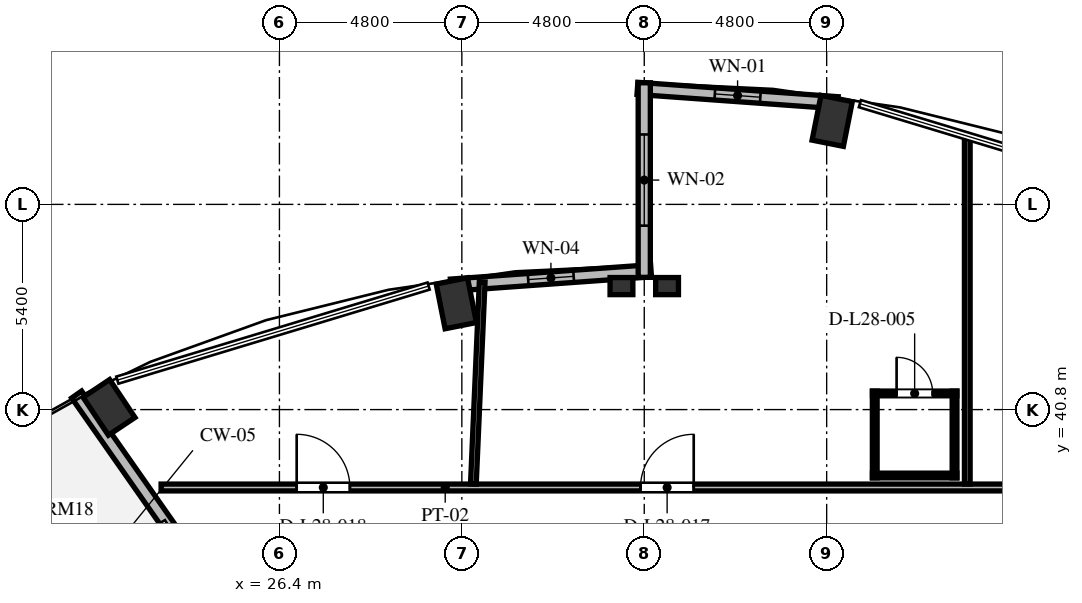
"""IFC4 building model, lengths in metres.
Left out: names, types, materials, properties, quantities, classifications, styles, units other than length and angle.
Written with IfcOpenShell. Run it as: python <this file> out.ifc"""

import sys

from ifc_helpers import new_model, si_unit, direction, frame, frame_2d, origin, origin_2d, place, context, subcontext, project, spatial, rectangle, extrude, element, fill, save


model = new_model("IFC4")
c1 = context("Model", 3, precision=1e-05, world=origin(), true_north=direction((0.0, 1.0)))
c2 = subcontext(c1, "Body", "Model", "MODEL_VIEW")
j1 = project(units=[si_unit("LENGTHUNIT", "METRE"), si_unit("PLANEANGLEUNIT", "RADIAN")], contexts=[c1])
p1 = place(None, origin())
s1 = spatial("IfcSite", under=j1, at=p1, CompositionType="ELEMENT")
p2 = place(p1, origin())
s2 = spatial("IfcBuilding", under=s1, at=p2, CompositionType="ELEMENT")
p3 = place(p2, frame((0.0, 0.0, 110.928)))
s3 = spatial("IfcBuildingStorey", under=s2, at=p3, CompositionType="ELEMENT", Elevation=110.928)
for number, where, z_axis, x_axis in (
    (1, (40.946, 48.397, 0.0), (0.0, 0.0, 1.0), (0.195, 0.981, 0.0)),
    (2, (31.054, 43.597, 0.0), (0.0, 0.0, 1.0), (-0.195, 0.981, 0.0)),
    (3, (21.916, 40.857, 0.0), (0.0, 0.0, 1.0), (-0.556, 0.831, 0.0)),
):
    element("IfcColumn", number, at=place(p3, frame(where, z_axis=z_axis, x_axis=x_axis)), inside=s3, PredefinedType="COLUMN", context=c2, shape_type="SweptSolid", body=[
        extrude(rectangle(XDim=1.2, YDim=0.84, at=origin_2d()), origin(), (0.0, 0.0, 1.0), 3.648),
    ])
for number, where, z_axis, x_axis in (
    (4, (35.4, 44.05, 0.0), (0.0, 0.0, 1.0), (1.0, 0.0, 0.0)),
    (5, (36.6, 44.05, 0.0), (0.0, 0.0, 1.0), (1.0, 0.0, 0.0)),
):
    element("IfcColumn", number, at=place(p3, frame(where, z_axis=z_axis, x_axis=x_axis)), inside=s3, PredefinedType="PILASTER", context=c2, shape_type="SweptSolid", body=[
        extrude(rectangle(XDim=0.6, YDim=0.45, at=origin_2d()), origin(), (0.0, 0.0, 1.0), 3.648),
    ])
p4 = place(p3, frame((41.091, 48.875, 0.0), z_axis=(0.0, 0.0, 1.0), x_axis=(-0.997432364291, 0.071614793619, 0.0)))
e6 = element("IfcWall", 6, at=p4, inside=s3, PredefinedType="SOLIDWALL", context=c2, shape_type="SweptSolid", body=[
    extrude(rectangle(XDim=5.284, YDim=0.32, at=frame_2d((2.642, 0.0))), origin(), (0.0, 0.0, 1.0), 3.428),
])
p5 = place(p4, frame((2.042, 0.0, 0.85)))
e7 = element("IfcOpeningElement", 7, at=p5, cuts=e6, PredefinedType="OPENING", context=c2, shape_type="SweptSolid", body=[
    extrude(rectangle(XDim=1.2, YDim=2.2, at=frame_2d((0.6, 1.1))), frame((0.0, 0.17, 0.0), z_axis=(0.0, -1.0, 0.0), x_axis=(1.0, 0.0, 0.0)), (0.0, 0.0, 1.0), 0.34),
])
p6 = place(p3, frame((36.179, 44.453, 0.0), z_axis=(0.0, 0.0, 1.0), x_axis=(-0.997431890304, -0.071621394884, 0.0)))
e8 = element("IfcWall", 8, at=p6, inside=s3, PredefinedType="SOLIDWALL", context=c2, shape_type="SweptSolid", body=[
    extrude(rectangle(XDim=5.284, YDim=0.32, at=frame_2d((2.642, 0.0))), origin(), (0.0, 0.0, 1.0), 3.428),
])
p7 = place(p6, frame((2.042, 0.0, 0.85)))
e9 = element("IfcOpeningElement", 9, at=p7, cuts=e8, PredefinedType="OPENING", context=c2, shape_type="SweptSolid", body=[
    extrude(rectangle(XDim=1.2, YDim=1.8, at=frame_2d((0.6, 0.9))), frame((0.0, 0.17, 0.0), z_axis=(0.0, -1.0, 0.0), x_axis=(1.0, 0.0, 0.0)), (0.0, 0.0, 1.0), 0.34),
])
p8 = place(p3, frame((36.0, 49.4, 0.0), z_axis=(0.0, 0.0, 1.0), x_axis=(0.0, -1.0, 0.0)))
e10 = element("IfcWall", 10, at=p8, inside=s3, PredefinedType="SOLIDWALL", context=c2, shape_type="SweptSolid", body=[
    extrude(rectangle(XDim=5.12, YDim=0.32, at=frame_2d((2.56, 0.0))), origin(), (0.0, 0.0, 1.0), 3.428),
])
p9 = place(p8, frame((1.36, 0.0, 0.84)))
e11 = element("IfcOpeningElement", 11, at=p9, cuts=e10, PredefinedType="OPENING", context=c2, shape_type="SweptSolid", body=[
    extrude(rectangle(XDim=2.4, YDim=2.04, at=frame_2d((1.2, 1.02))), frame((0.0, 0.17, 0.0), z_axis=(0.0, -1.0, 0.0), x_axis=(1.0, 0.0, 0.0)), (0.0, 0.0, 1.0), 0.34),
])
p10 = place(p3, frame((21.064, 41.197, 0.0), z_axis=(0.0, 0.0, 1.0), x_axis=(0.573586931721, -0.819144695252, 0.0)))
e12 = element("IfcWall", 12, at=p10, inside=s3, PredefinedType="SOLIDWALL", context=c2, shape_type="SweptSolid", body=[
    extrude(rectangle(XDim=4.34, YDim=0.32, at=frame_2d((2.17, 0.0))), origin(), (0.0, 0.0, 1.0), 3.428),
])
p11 = place(p3, frame((23.287, 38.75, 0.0), z_axis=(0.0, 0.0, 1.0), x_axis=(1.0, 0.0, 0.0)))
e13 = element("IfcWall", 13, at=p11, inside=s3, PredefinedType="PARTITIONING", context=c2, shape_type="SweptSolid", body=[
    extrude(rectangle(XDim=29.903, YDim=0.18, at=frame_2d((14.952, 0.0))), origin(), (0.0, 0.0, 1.0), 3.053),
])
p12 = place(p11, frame((12.615, 0.0, 0.0)))
e14 = element("IfcOpeningElement", 14, at=p12, cuts=e13, PredefinedType="OPENING", context=c2, shape_type="SweptSolid", body=[
    extrude(rectangle(XDim=1.4, YDim=2.2, at=frame_2d((0.7, 1.1))), frame((0.0, 0.1, 0.0), z_axis=(0.0, -1.0, 0.0), x_axis=(1.0, 0.0, 0.0)), (0.0, 0.0, 1.0), 0.2),
])
p13 = place(p11, frame((3.567, 0.0, 0.0)))
e15 = element("IfcOpeningElement", 15, at=p13, cuts=e13, PredefinedType="OPENING", context=c2, shape_type="SweptSolid", body=[
    extrude(rectangle(XDim=1.4, YDim=2.2, at=frame_2d((0.7, 1.1))), frame((0.0, 0.1, 0.0), z_axis=(0.0, -1.0, 0.0), x_axis=(1.0, 0.0, 0.0)), (0.0, 0.0, 1.0), 0.2),
])
p14 = place(p3, frame((31.503, 38.84, 0.0), z_axis=(0.0, 0.0, 1.0), x_axis=(0.043494903789, 0.999053648882, 0.0)))
e16 = element("IfcWall", 16, at=p14, inside=s3, PredefinedType="PARTITIONING", context=c2, shape_type="SweptSolid", body=[
    extrude(rectangle(XDim=5.327, YDim=0.15, at=frame_2d((2.664, 0.0))), origin(), (0.0, 0.0, 1.0), 2.813),
])
p15 = place(p3, frame((44.5, 38.84, 0.0), z_axis=(0.0, 0.0, 1.0), x_axis=(0.0, 1.0, 0.0)))
e17 = element("IfcWall", 17, at=p15, inside=s3, PredefinedType="PARTITIONING", context=c2, shape_type="SweptSolid", body=[
    extrude(rectangle(XDim=9.143, YDim=0.15, at=frame_2d((4.571, 0.0))), origin(), (0.0, 0.0, 1.0), 3.428),
])
p16 = place(p3, frame((42.005, 41.225, 0.0), z_axis=(0.0, 0.0, 1.0), x_axis=(1.0, 0.0, 0.0)))
e18 = element("IfcWall", 18, at=p16, inside=s3, PredefinedType="PARTITIONING", context=c2, shape_type="SweptSolid", body=[
    extrude(rectangle(XDim=2.22, YDim=0.125, at=frame_2d((1.11, 0.0))), origin(), (0.0, 0.0, 1.0), 3.428),
])
p17 = place(p16, frame((0.635, 0.0, 0.0)))
e19 = element("IfcOpeningElement", 19, at=p17, cuts=e18, PredefinedType="OPENING", context=c2, shape_type="SweptSolid", body=[
    extrude(rectangle(XDim=0.95, YDim=2.1, at=frame_2d((0.475, 1.05))), frame((0.0, 0.073, 0.0), z_axis=(0.0, -1.0, 0.0), x_axis=(1.0, 0.0, 0.0)), (0.0, 0.0, 1.0), 0.145),
])
p18 = place(p3, frame((42.005, 39.065, 0.0), z_axis=(0.0, 0.0, 1.0), x_axis=(1.0, 0.0, 0.0)))
e20 = element("IfcWall", 20, at=p18, inside=s3, PredefinedType="PARTITIONING", context=c2, shape_type="SweptSolid", body=[
    extrude(rectangle(XDim=2.22, YDim=0.125, at=frame_2d((1.11, 0.0))), origin(), (0.0, 0.0, 1.0), 3.428),
])
for number, where, z_axis, x_axis in (
    (21, (44.165, 39.005, 0.0), (0.0, 0.0, 1.0), (0.0, 1.0, 0.0)),
    (22, (42.065, 39.005, 0.0), (0.0, 0.0, 1.0), (0.0, 1.0, 0.0)),
):
    element("IfcWall", number, at=place(p3, frame(where, z_axis=z_axis, x_axis=x_axis)), inside=s3, PredefinedType="PARTITIONING", context=c2, shape_type="SweptSolid", body=[
        extrude(rectangle(XDim=2.28, YDim=0.125, at=frame_2d((1.14, 0.0))), origin(), (0.0, 0.0, 1.0), 3.428),
    ])
p19 = place(p5, origin())
e23 = element("IfcWindow", 23, at=p19, inside=s3, PartitioningType="SINGLE_PANEL", PredefinedType="WINDOW", context=c2, shape_type="SweptSolid", body=[
    extrude(rectangle(XDim=1.2, YDim=2.2, at=frame_2d((0.6, 1.1))), frame((0.0, 0.03, 0.0), z_axis=(0.0, -1.0, 0.0), x_axis=(1.0, 0.0, 0.0)), (0.0, 0.0, 1.0), 0.06),
])
fill(e7, e23)
p20 = place(p7, origin())
e24 = element("IfcWindow", 24, at=p20, inside=s3, PartitioningType="SINGLE_PANEL", PredefinedType="WINDOW", context=c2, shape_type="SweptSolid", body=[
    extrude(rectangle(XDim=1.2, YDim=1.8, at=frame_2d((0.6, 0.9))), frame((0.0, 0.03, 0.0), z_axis=(0.0, -1.0, 0.0), x_axis=(1.0, 0.0, 0.0)), (0.0, 0.0, 1.0), 0.06),
])
fill(e9, e24)
p21 = place(p9, origin())
e25 = element("IfcWindow", 25, at=p21, inside=s3, PartitioningType="SINGLE_PANEL", PredefinedType="WINDOW", context=c2, shape_type="SweptSolid", body=[
    extrude(rectangle(XDim=2.4, YDim=2.04, at=frame_2d((1.2, 1.02))), frame((0.0, 0.03, 0.0), z_axis=(0.0, -1.0, 0.0), x_axis=(1.0, 0.0, 0.0)), (0.0, 0.0, 1.0), 0.06),
])
fill(e11, e25)
p22 = place(p17, origin())
e26 = element("IfcDoor", 26, at=p22, inside=s3, OperationType="SINGLE_SWING_LEFT", PredefinedType="DOOR", context=c2, shape_type="SweptSolid", body=[
    extrude(rectangle(XDim=0.95, YDim=2.1, at=frame_2d((0.475, 1.05))), frame((0.0, 0.025, 0.0), z_axis=(0.0, -1.0, 0.0), x_axis=(1.0, 0.0, 0.0)), (0.0, 0.0, 1.0), 0.05),
])
fill(e19, e26)
p23 = place(p12, origin())
e27 = element("IfcDoor", 27, at=p23, inside=s3, OperationType="SINGLE_SWING_RIGHT", PredefinedType="DOOR", context=c2, shape_type="SweptSolid", body=[
    extrude(rectangle(XDim=1.4, YDim=2.2, at=frame_2d((0.7, 1.1))), frame((0.0, 0.025, 0.0), z_axis=(0.0, -1.0, 0.0), x_axis=(1.0, 0.0, 0.0)), (0.0, 0.0, 1.0), 0.05),
])
fill(e14, e27)
p24 = place(p13, origin())
e28 = element("IfcDoor", 28, at=p24, inside=s3, OperationType="SINGLE_SWING_LEFT", PredefinedType="DOOR", context=c2, shape_type="SweptSolid", body=[
    extrude(rectangle(XDim=1.4, YDim=2.2, at=frame_2d((0.7, 1.1))), frame((0.0, 0.025, 0.0), z_axis=(0.0, -1.0, 0.0), x_axis=(1.0, 0.0, 0.0)), (0.0, 0.0, 1.0), 0.05),
])
fill(e15, e28)
save(model, sys.argv[1])
